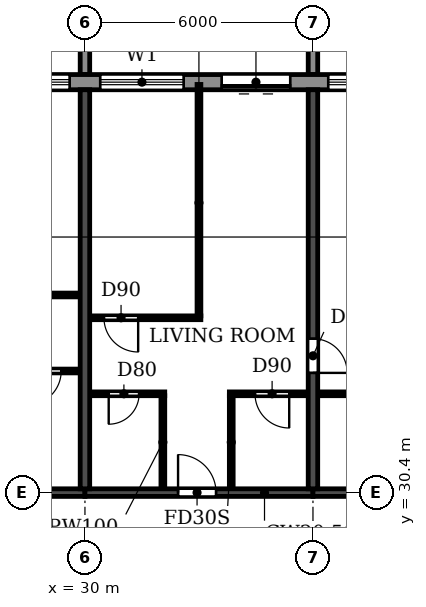
"""IFC4 building model, lengths in metres.
Left out: names, types, materials, properties, quantities, classifications, styles, units other than length and angle.
Written with IfcOpenShell. Run it as: python <this file> out.ifc"""

import sys

from ifc_helpers import new_model, si_unit, direction, frame, frame_2d, origin, place, context, subcontext, project, spatial, polyline, rectangle, outline, extrude, source, transform, mapped, element, fill, save


model = new_model("IFC4")
c1 = context("Model", 3, precision=1e-05, world=origin(), true_north=direction((0.0, 1.0)))
c2 = subcontext(c1, "Body", "Model", "MODEL_VIEW")
j1 = project(units=[si_unit("LENGTHUNIT", "METRE"), si_unit("PLANEANGLEUNIT", "RADIAN")], contexts=[c1])
p1 = place(None, origin())
s1 = spatial("IfcSite", under=j1, at=p1, CompositionType="ELEMENT")
p2 = place(p1, origin())
s2 = spatial("IfcBuilding", under=s1, at=p2, CompositionType="ELEMENT")
p3 = place(p2, frame((0.0, 0.0, 181.8)))
s3 = spatial("IfcBuildingStorey", under=s2, at=p3, CompositionType="ELEMENT", Elevation=181.8)
p4 = place(p3, frame((30.0, 30.5, 0.0), z_axis=(0.0, 0.0, 1.0), x_axis=(0.0, 1.0, 0.0)))
e1 = element("IfcWall", 1, at=p4, inside=s3, PredefinedType="SHEAR", context=c2, shape_type="SweptSolid", body=[
    extrude(rectangle(XDim=10.5, YDim=0.25, at=frame_2d((5.25, 0.0))), origin(), (0.0, 0.0, 1.0), 3.08),
])
p5 = place(p3, frame((36.0, 30.5, 0.0), z_axis=(0.0, 0.0, 1.0), x_axis=(0.0, 1.0, 0.0)))
e2 = element("IfcWall", 2, at=p5, inside=s3, PredefinedType="SHEAR", context=c2, shape_type="SweptSolid", body=[
    extrude(rectangle(XDim=10.5, YDim=0.25, at=frame_2d((5.25, 0.0))), origin(), (0.0, 0.0, 1.0), 3.08),
])
p6 = place(p5, frame((3.05, 0.0, 0.0)))
e3 = element("IfcOpeningElement", 3, at=p6, cuts=e2, PredefinedType="OPENING", context=c2, shape_type="SweptSolid", body=[
    extrude(rectangle(XDim=0.9, YDim=2.1, at=frame_2d((0.45, 1.05))), frame((0.0, 0.135, 0.0), z_axis=(0.0, -1.0, 0.0), x_axis=(1.0, 0.0, 0.0)), (0.0, 0.0, 1.0), 0.27),
])
p7 = place(p3, frame((24.0, 30.4, 0.0), z_axis=(0.0, 0.0, 1.0), x_axis=(1.0, 0.0, 0.0)))
e4 = element("IfcWall", 4, at=p7, inside=s3, PredefinedType="SHEAR", context=c2, shape_type="SweptSolid", body=[
    extrude(rectangle(XDim=6.0, YDim=0.2, at=frame_2d((3.0, 0.0))), origin(), (0.0, 0.0, 1.0), 2.48),
])
p8 = place(p7, frame((2.45, 0.0, 0.0)))
e5 = element("IfcOpeningElement", 5, at=p8, cuts=e4, PredefinedType="OPENING", context=c2, shape_type="SweptSolid", body=[
    extrude(rectangle(XDim=1.0, YDim=2.1, at=frame_2d((0.5, 1.05))), frame((0.0, 0.11, 0.0), z_axis=(0.0, -1.0, 0.0), x_axis=(1.0, 0.0, 0.0)), (0.0, 0.0, 1.0), 0.22),
])
p9 = place(p3, frame((30.0, 30.4, 0.0), z_axis=(0.0, 0.0, 1.0), x_axis=(1.0, 0.0, 0.0)))
e6 = element("IfcWall", 6, at=p9, inside=s3, PredefinedType="SHEAR", context=c2, shape_type="SweptSolid", body=[
    extrude(rectangle(XDim=6.0, YDim=0.2, at=frame_2d((3.0, 0.0))), origin(), (0.0, 0.0, 1.0), 2.48),
])
p10 = place(p9, frame((2.45, 0.0, 0.0)))
e7 = element("IfcOpeningElement", 7, at=p10, cuts=e6, PredefinedType="OPENING", context=c2, shape_type="SweptSolid", body=[
    extrude(rectangle(XDim=1.0, YDim=2.1, at=frame_2d((0.5, 1.05))), frame((0.0, 0.11, 0.0), z_axis=(0.0, -1.0, 0.0), x_axis=(1.0, 0.0, 0.0)), (0.0, 0.0, 1.0), 0.22),
])
p11 = place(p3, frame((36.0, 30.4, 0.0), z_axis=(0.0, 0.0, 1.0), x_axis=(1.0, 0.0, 0.0)))
e8 = element("IfcWall", 8, at=p11, inside=s3, PredefinedType="SHEAR", context=c2, shape_type="SweptSolid", body=[
    extrude(rectangle(XDim=6.0, YDim=0.2, at=frame_2d((3.0, 0.0))), origin(), (0.0, 0.0, 1.0), 2.48),
])
p12 = place(p3, frame((79.317, 41.2, 0.0), z_axis=(0.0, 0.0, 1.0), x_axis=(-1.0, 0.0, 0.0)))
e9 = element("IfcWall", 9, at=p12, inside=s3, PredefinedType="STANDARD", context=c2, shape_type="SweptSolid", body=[
    extrude(rectangle(XDim=56.634, YDim=0.4, at=frame_2d((28.317, 0.0))), origin(), (0.0, 0.0, 1.0), 3.08),
])
p13 = place(p12, frame((52.917, 0.0, 0.0)))
e10 = element("IfcOpeningElement", 10, at=p13, cuts=e9, PredefinedType="OPENING", context=c2, shape_type="SweptSolid", body=[
    extrude(rectangle(XDim=1.8, YDim=2.4, at=frame_2d((0.9, 1.2))), frame((0.0, 0.21, 0.0), z_axis=(0.0, -1.0, 0.0), x_axis=(1.0, 0.0, 0.0)), (0.0, 0.0, 1.0), 0.42),
])
p14 = place(p12, frame((49.717, 0.0, 0.9)))
e11 = element("IfcOpeningElement", 11, at=p14, cuts=e9, PredefinedType="OPENING", context=c2, shape_type="SweptSolid", body=[
    extrude(rectangle(XDim=2.2, YDim=1.5, at=frame_2d((1.1, 0.75))), frame((0.0, 0.21, 0.0), z_axis=(0.0, -1.0, 0.0), x_axis=(1.0, 0.0, 0.0)), (0.0, 0.0, 1.0), 0.42),
])
p15 = place(p12, frame((46.717, 0.0, 0.9)))
e12 = element("IfcOpeningElement", 12, at=p15, cuts=e9, PredefinedType="OPENING", context=c2, shape_type="SweptSolid", body=[
    extrude(rectangle(XDim=2.2, YDim=1.5, at=frame_2d((1.1, 0.75))), frame((0.0, 0.21, 0.0), z_axis=(0.0, -1.0, 0.0), x_axis=(1.0, 0.0, 0.0)), (0.0, 0.0, 1.0), 0.42),
])
p16 = place(p12, frame((43.917, 0.0, 0.0)))
e13 = element("IfcOpeningElement", 13, at=p16, cuts=e9, PredefinedType="OPENING", context=c2, shape_type="SweptSolid", body=[
    extrude(rectangle(XDim=1.8, YDim=2.4, at=frame_2d((0.9, 1.2))), frame((0.0, 0.21, 0.0), z_axis=(0.0, -1.0, 0.0), x_axis=(1.0, 0.0, 0.0)), (0.0, 0.0, 1.0), 0.42),
])
p17 = place(p12, frame((40.717, 0.0, 0.9)))
e14 = element("IfcOpeningElement", 14, at=p17, cuts=e9, PredefinedType="OPENING", context=c2, shape_type="SweptSolid", body=[
    extrude(rectangle(XDim=2.2, YDim=1.5, at=frame_2d((1.1, 0.75))), frame((0.0, 0.21, 0.0), z_axis=(0.0, -1.0, 0.0), x_axis=(1.0, 0.0, 0.0)), (0.0, 0.0, 1.0), 0.42),
])
p18 = place(p12, frame((37.717, 0.0, 0.9)))
e15 = element("IfcOpeningElement", 15, at=p18, cuts=e9, PredefinedType="OPENING", context=c2, shape_type="SweptSolid", body=[
    extrude(rectangle(XDim=2.2, YDim=1.5, at=frame_2d((1.1, 0.75))), frame((0.0, 0.21, 0.0), z_axis=(0.0, -1.0, 0.0), x_axis=(1.0, 0.0, 0.0)), (0.0, 0.0, 1.0), 0.42),
])
p19 = place(p12, frame((34.917, 0.0, 0.0)))
e16 = element("IfcOpeningElement", 16, at=p19, cuts=e9, PredefinedType="OPENING", context=c2, shape_type="SweptSolid", body=[
    extrude(rectangle(XDim=1.8, YDim=2.4, at=frame_2d((0.9, 1.2))), frame((0.0, 0.21, 0.0), z_axis=(0.0, -1.0, 0.0), x_axis=(1.0, 0.0, 0.0)), (0.0, 0.0, 1.0), 0.42),
])
p20 = place(p12, frame((31.717, 0.0, 0.9)))
e17 = element("IfcOpeningElement", 17, at=p20, cuts=e9, PredefinedType="OPENING", context=c2, shape_type="SweptSolid", body=[
    extrude(rectangle(XDim=2.2, YDim=1.5, at=frame_2d((1.1, 0.75))), frame((0.0, 0.21, 0.0), z_axis=(0.0, -1.0, 0.0), x_axis=(1.0, 0.0, 0.0)), (0.0, 0.0, 1.0), 0.42),
])
p21 = place(p12, frame((28.717, 0.0, 0.9)))
e18 = element("IfcOpeningElement", 18, at=p21, cuts=e9, PredefinedType="OPENING", context=c2, shape_type="SweptSolid", body=[
    extrude(rectangle(XDim=2.2, YDim=1.5, at=frame_2d((1.1, 0.75))), frame((0.0, 0.21, 0.0), z_axis=(0.0, -1.0, 0.0), x_axis=(1.0, 0.0, 0.0)), (0.0, 0.0, 1.0), 0.42),
])
p22 = place(p12, frame((25.717, 0.0, 0.9)))
e19 = element("IfcOpeningElement", 19, at=p22, cuts=e9, PredefinedType="OPENING", context=c2, shape_type="SweptSolid", body=[
    extrude(rectangle(XDim=2.2, YDim=1.5, at=frame_2d((1.1, 0.75))), frame((0.0, 0.21, 0.0), z_axis=(0.0, -1.0, 0.0), x_axis=(1.0, 0.0, 0.0)), (0.0, 0.0, 1.0), 0.42),
])
p23 = place(p12, frame((22.917, 0.0, 0.0)))
e20 = element("IfcOpeningElement", 20, at=p23, cuts=e9, PredefinedType="OPENING", context=c2, shape_type="SweptSolid", body=[
    extrude(rectangle(XDim=1.8, YDim=2.4, at=frame_2d((0.9, 1.2))), frame((0.0, 0.21, 0.0), z_axis=(0.0, -1.0, 0.0), x_axis=(1.0, 0.0, 0.0)), (0.0, 0.0, 1.0), 0.42),
])
p24 = place(p12, frame((19.717, 0.0, 0.9)))
e21 = element("IfcOpeningElement", 21, at=p24, cuts=e9, PredefinedType="OPENING", context=c2, shape_type="SweptSolid", body=[
    extrude(rectangle(XDim=2.2, YDim=1.5, at=frame_2d((1.1, 0.75))), frame((0.0, 0.21, 0.0), z_axis=(0.0, -1.0, 0.0), x_axis=(1.0, 0.0, 0.0)), (0.0, 0.0, 1.0), 0.42),
])
p25 = place(p12, frame((16.917, 0.0, 0.0)))
e22 = element("IfcOpeningElement", 22, at=p25, cuts=e9, PredefinedType="OPENING", context=c2, shape_type="SweptSolid", body=[
    extrude(rectangle(XDim=1.8, YDim=2.4, at=frame_2d((0.9, 1.2))), frame((0.0, 0.21, 0.0), z_axis=(0.0, -1.0, 0.0), x_axis=(1.0, 0.0, 0.0)), (0.0, 0.0, 1.0), 0.42),
])
p26 = place(p12, frame((13.717, 0.0, 0.9)))
e23 = element("IfcOpeningElement", 23, at=p26, cuts=e9, PredefinedType="OPENING", context=c2, shape_type="SweptSolid", body=[
    extrude(rectangle(XDim=2.2, YDim=1.5, at=frame_2d((1.1, 0.75))), frame((0.0, 0.21, 0.0), z_axis=(0.0, -1.0, 0.0), x_axis=(1.0, 0.0, 0.0)), (0.0, 0.0, 1.0), 0.42),
])
p27 = place(p12, frame((10.917, 0.0, 0.0)))
e24 = element("IfcOpeningElement", 24, at=p27, cuts=e9, PredefinedType="OPENING", context=c2, shape_type="SweptSolid", body=[
    extrude(rectangle(XDim=1.8, YDim=2.4, at=frame_2d((0.9, 1.2))), frame((0.0, 0.21, 0.0), z_axis=(0.0, -1.0, 0.0), x_axis=(1.0, 0.0, 0.0)), (0.0, 0.0, 1.0), 0.42),
])
p28 = place(p12, frame((7.717, 0.0, 0.9)))
e25 = element("IfcOpeningElement", 25, at=p28, cuts=e9, PredefinedType="OPENING", context=c2, shape_type="SweptSolid", body=[
    extrude(rectangle(XDim=2.2, YDim=1.5, at=frame_2d((1.1, 0.75))), frame((0.0, 0.21, 0.0), z_axis=(0.0, -1.0, 0.0), x_axis=(1.0, 0.0, 0.0)), (0.0, 0.0, 1.0), 0.42),
])
p29 = place(p12, frame((4.717, 0.0, 0.9)))
e26 = element("IfcOpeningElement", 26, at=p29, cuts=e9, PredefinedType="OPENING", context=c2, shape_type="SweptSolid", body=[
    extrude(rectangle(XDim=2.2, YDim=1.5, at=frame_2d((1.1, 0.75))), frame((0.0, 0.21, 0.0), z_axis=(0.0, -1.0, 0.0), x_axis=(1.0, 0.0, 0.0)), (0.0, 0.0, 1.0), 0.42),
])
p30 = place(p12, frame((1.917, 0.0, 0.0)))
e27 = element("IfcOpeningElement", 27, at=p30, cuts=e9, PredefinedType="OPENING", context=c2, shape_type="SweptSolid", body=[
    extrude(rectangle(XDim=1.8, YDim=2.4, at=frame_2d((0.9, 1.2))), frame((0.0, 0.21, 0.0), z_axis=(0.0, -1.0, 0.0), x_axis=(1.0, 0.0, 0.0)), (0.0, 0.0, 1.0), 0.42),
])
m1 = source(origin(), c2, "Body", "SweptSolid", [
    extrude(outline(polyline([(0.0, 0.0), (0.25, 0.0), (0.25, 3.1), (0.0, 3.1), (0.0, 0.0)])), origin(), (0.0, 0.0, 1.0), 3.1),
])
for number, where in (
    (28, (29.875, 41.4, 0.0)),
    (29, (35.875, 41.4, 0.0)),
):
    element("IfcWall", number, at=place(p3, frame(where)), inside=s3, PredefinedType="STANDARD", context=c2, shape_type="MappedRepresentation", body=[
        mapped(m1, transform((0.0, 0.0, 0.0))),
    ])
p31 = place(p3, frame((30.135, 33.0, 0.0), z_axis=(0.0, 0.0, 1.0), x_axis=(1.0, 0.0, 0.0)))
e30 = element("IfcWall", 30, at=p31, inside=s3, PredefinedType="PARTITIONING", context=c2, shape_type="SweptSolid", body=[
    extrude(rectangle(XDim=1.965, YDim=0.1, at=frame_2d((0.982, 0.0))), origin(), (0.0, 0.0, 1.0), 3.08),
])
p32 = place(p31, frame((0.49, 0.0, 0.0)))
e31 = element("IfcOpeningElement", 31, at=p32, cuts=e30, PredefinedType="OPENING", context=c2, shape_type="SweptSolid", body=[
    extrude(rectangle(XDim=0.8, YDim=2.1, at=frame_2d((0.4, 1.05))), frame((0.0, 0.06, 0.0), z_axis=(0.0, -1.0, 0.0), x_axis=(1.0, 0.0, 0.0)), (0.0, 0.0, 1.0), 0.12),
])
p33 = place(p3, frame((33.8, 33.0, 0.0), z_axis=(0.0, 0.0, 1.0), x_axis=(1.0, 0.0, 0.0)))
e32 = element("IfcWall", 32, at=p33, inside=s3, PredefinedType="PARTITIONING", context=c2, shape_type="SweptSolid", body=[
    extrude(rectangle(XDim=2.065, YDim=0.1, at=frame_2d((1.032, 0.0))), origin(), (0.0, 0.0, 1.0), 3.08),
])
p34 = place(p33, frame((0.675, 0.0, 0.0)))
e33 = element("IfcOpeningElement", 33, at=p34, cuts=e32, PredefinedType="OPENING", context=c2, shape_type="SweptSolid", body=[
    extrude(rectangle(XDim=0.9, YDim=2.1, at=frame_2d((0.45, 1.05))), frame((0.0, 0.06, 0.0), z_axis=(0.0, -1.0, 0.0), x_axis=(1.0, 0.0, 0.0)), (0.0, 0.0, 1.0), 0.12),
])
p35 = place(p3, frame((36.135, 33.0, 0.0), z_axis=(0.0, 0.0, 1.0), x_axis=(1.0, 0.0, 0.0)))
e34 = element("IfcWall", 34, at=p35, inside=s3, PredefinedType="PARTITIONING", context=c2, shape_type="SweptSolid", body=[
    extrude(rectangle(XDim=2.965, YDim=0.1, at=frame_2d((1.482, 0.0))), origin(), (0.0, 0.0, 1.0), 3.08),
])
p36 = place(p35, frame((0.965, 0.0, 0.0)))
e35 = element("IfcOpeningElement", 35, at=p36, cuts=e34, PredefinedType="OPENING", context=c2, shape_type="SweptSolid", body=[
    extrude(rectangle(XDim=0.8, YDim=2.1, at=frame_2d((0.4, 1.05))), frame((0.0, 0.06, 0.0), z_axis=(0.0, -1.0, 0.0), x_axis=(1.0, 0.0, 0.0)), (0.0, 0.0, 1.0), 0.12),
])
p37 = place(p3, frame((27.8, 33.6, 0.0), z_axis=(0.0, 0.0, 1.0), x_axis=(1.0, 0.0, 0.0)))
e36 = element("IfcWall", 36, at=p37, inside=s3, PredefinedType="PARTITIONING", context=c2, shape_type="SweptSolid", body=[
    extrude(rectangle(XDim=2.065, YDim=0.1, at=frame_2d((1.032, 0.0))), origin(), (0.0, 0.0, 1.0), 3.08),
])
p38 = place(p37, frame((0.675, 0.0, 0.0)))
e37 = element("IfcOpeningElement", 37, at=p38, cuts=e36, PredefinedType="OPENING", context=c2, shape_type="SweptSolid", body=[
    extrude(rectangle(XDim=0.9, YDim=2.1, at=frame_2d((0.45, 1.05))), frame((0.0, 0.06, 0.0), z_axis=(0.0, -1.0, 0.0), x_axis=(1.0, 0.0, 0.0)), (0.0, 0.0, 1.0), 0.12),
])
p39 = place(p3, frame((30.135, 35.0, 0.0), z_axis=(0.0, 0.0, 1.0), x_axis=(1.0, 0.0, 0.0)))
e38 = element("IfcWall", 38, at=p39, inside=s3, PredefinedType="PARTITIONING", context=c2, shape_type="SweptSolid", body=[
    extrude(rectangle(XDim=2.915, YDim=0.1, at=frame_2d((1.458, 0.0))), origin(), (0.0, 0.0, 1.0), 3.08),
])
p40 = place(p39, frame((0.365, 0.0, 0.0)))
e39 = element("IfcOpeningElement", 39, at=p40, cuts=e38, PredefinedType="OPENING", context=c2, shape_type="SweptSolid", body=[
    extrude(rectangle(XDim=0.9, YDim=2.1, at=frame_2d((0.45, 1.05))), frame((0.0, 0.06, 0.0), z_axis=(0.0, -1.0, 0.0), x_axis=(1.0, 0.0, 0.0)), (0.0, 0.0, 1.0), 0.12),
])
p41 = place(p3, frame((26.95, 35.6, 0.0), z_axis=(0.0, 0.0, 1.0), x_axis=(1.0, 0.0, 0.0)))
e40 = element("IfcWall", 40, at=p41, inside=s3, PredefinedType="PARTITIONING", context=c2, shape_type="SweptSolid", body=[
    extrude(rectangle(XDim=2.915, YDim=0.1, at=frame_2d((1.458, 0.0))), origin(), (0.0, 0.0, 1.0), 3.08),
])
p42 = place(p41, frame((0.55, 0.0, 0.0)))
e41 = element("IfcOpeningElement", 41, at=p42, cuts=e40, PredefinedType="OPENING", context=c2, shape_type="SweptSolid", body=[
    extrude(rectangle(XDim=0.9, YDim=2.1, at=frame_2d((0.45, 1.05))), frame((0.0, 0.06, 0.0), z_axis=(0.0, -1.0, 0.0), x_axis=(1.0, 0.0, 0.0)), (0.0, 0.0, 1.0), 0.12),
])
p43 = place(p3, frame((32.05, 30.51, 0.0), z_axis=(0.0, 0.0, 1.0), x_axis=(0.0, 1.0, 0.0)))
e42 = element("IfcWall", 42, at=p43, inside=s3, PredefinedType="PARTITIONING", context=c2, shape_type="SweptSolid", body=[
    extrude(rectangle(XDim=2.44, YDim=0.1, at=frame_2d((1.22, 0.0))), origin(), (0.0, 0.0, 1.0), 3.08),
])
p44 = place(p3, frame((33.0, 35.05, 0.0), z_axis=(0.0, 0.0, 1.0), x_axis=(0.0, 1.0, 0.0)))
e43 = element("IfcWall", 43, at=p44, inside=s3, PredefinedType="PARTITIONING", context=c2, shape_type="SweptSolid", body=[
    extrude(rectangle(XDim=6.09, YDim=0.1, at=frame_2d((3.045, 0.0))), origin(), (0.0, 0.0, 1.0), 3.08),
])
p45 = place(p3, frame((33.85, 30.51, 0.0), z_axis=(0.0, 0.0, 1.0), x_axis=(0.0, 1.0, 0.0)))
e44 = element("IfcWall", 44, at=p45, inside=s3, PredefinedType="PARTITIONING", context=c2, shape_type="SweptSolid", body=[
    extrude(rectangle(XDim=2.44, YDim=0.1, at=frame_2d((1.22, 0.0))), origin(), (0.0, 0.0, 1.0), 3.08),
])
p46 = place(p14, origin())
e45 = element("IfcWindow", 45, at=p46, inside=s3, PartitioningType="DOUBLE_PANEL_HORIZONTAL", PredefinedType="WINDOW", context=c2, shape_type="SweptSolid", body=[
    extrude(rectangle(XDim=2.2, YDim=1.5, at=frame_2d((1.1, 0.75))), frame((0.0, 0.03, 0.0), z_axis=(0.0, -1.0, 0.0), x_axis=(1.0, 0.0, 0.0)), (0.0, 0.0, 1.0), 0.06),
])
fill(e11, e45)
p47 = place(p15, origin())
e46 = element("IfcWindow", 46, at=p47, inside=s3, PartitioningType="DOUBLE_PANEL_HORIZONTAL", PredefinedType="WINDOW", context=c2, shape_type="SweptSolid", body=[
    extrude(rectangle(XDim=2.2, YDim=1.5, at=frame_2d((1.1, 0.75))), frame((0.0, 0.03, 0.0), z_axis=(0.0, -1.0, 0.0), x_axis=(1.0, 0.0, 0.0)), (0.0, 0.0, 1.0), 0.06),
])
fill(e12, e46)
p48 = place(p16, origin())
e47 = element("IfcDoor", 47, at=p48, inside=s3, OperationType="DOUBLE_DOOR_SLIDING", PredefinedType="DOOR", context=c2, shape_type="SweptSolid", body=[
    extrude(rectangle(XDim=1.8, YDim=2.4, at=frame_2d((0.9, 1.2))), frame((0.0, 0.025, 0.0), z_axis=(0.0, -1.0, 0.0), x_axis=(1.0, 0.0, 0.0)), (0.0, 0.0, 1.0), 0.05),
])
fill(e13, e47)
p49 = place(p17, origin())
e48 = element("IfcWindow", 48, at=p49, inside=s3, PartitioningType="DOUBLE_PANEL_HORIZONTAL", PredefinedType="WINDOW", context=c2, shape_type="SweptSolid", body=[
    extrude(rectangle(XDim=2.2, YDim=1.5, at=frame_2d((1.1, 0.75))), frame((0.0, 0.03, 0.0), z_axis=(0.0, -1.0, 0.0), x_axis=(1.0, 0.0, 0.0)), (0.0, 0.0, 1.0), 0.06),
])
fill(e14, e48)
p50 = place(p38, frame((0.9, 0.0, 0.0), z_axis=(0.0, 0.0, 1.0), x_axis=(-1.0, 0.0, 0.0)))
e49 = element("IfcDoor", 49, at=p50, inside=s3, OperationType="SINGLE_SWING_RIGHT", PredefinedType="DOOR", context=c2, shape_type="SweptSolid", body=[
    extrude(rectangle(XDim=0.9, YDim=2.1, at=frame_2d((0.45, 1.05))), frame((0.0, 0.025, 0.0), z_axis=(0.0, -1.0, 0.0), x_axis=(1.0, 0.0, 0.0)), (0.0, 0.0, 1.0), 0.05),
])
fill(e37, e49)
p51 = place(p40, frame((0.9, 0.0, 0.0), z_axis=(0.0, 0.0, 1.0), x_axis=(-1.0, 0.0, 0.0)))
e50 = element("IfcDoor", 50, at=p51, inside=s3, OperationType="SINGLE_SWING_LEFT", PredefinedType="DOOR", context=c2, shape_type="SweptSolid", body=[
    extrude(rectangle(XDim=0.9, YDim=2.1, at=frame_2d((0.45, 1.05))), frame((0.0, 0.025, 0.0), z_axis=(0.0, -1.0, 0.0), x_axis=(1.0, 0.0, 0.0)), (0.0, 0.0, 1.0), 0.05),
])
fill(e39, e50)
p52 = place(p32, frame((0.8, 0.0, 0.0), z_axis=(0.0, 0.0, 1.0), x_axis=(-1.0, 0.0, 0.0)))
e51 = element("IfcDoor", 51, at=p52, inside=s3, OperationType="SINGLE_SWING_RIGHT", PredefinedType="DOOR", context=c2, shape_type="SweptSolid", body=[
    extrude(rectangle(XDim=0.8, YDim=2.1, at=frame_2d((0.4, 1.05))), frame((0.0, 0.025, 0.0), z_axis=(0.0, -1.0, 0.0), x_axis=(1.0, 0.0, 0.0)), (0.0, 0.0, 1.0), 0.05),
])
fill(e31, e51)
p53 = place(p10, origin())
e52 = element("IfcDoor", 52, at=p53, inside=s3, OperationType="SINGLE_SWING_LEFT", PredefinedType="DOOR", context=c2, shape_type="SweptSolid", body=[
    extrude(rectangle(XDim=1.0, YDim=2.1, at=frame_2d((0.5, 1.05))), frame((0.0, 0.025, 0.0), z_axis=(0.0, -1.0, 0.0), x_axis=(1.0, 0.0, 0.0)), (0.0, 0.0, 1.0), 0.05),
])
fill(e7, e52)
p54 = place(p34, frame((0.9, 0.0, 0.0), z_axis=(0.0, 0.0, 1.0), x_axis=(-1.0, 0.0, 0.0)))
e53 = element("IfcDoor", 53, at=p54, inside=s3, OperationType="SINGLE_SWING_LEFT", PredefinedType="DOOR", context=c2, shape_type="SweptSolid", body=[
    extrude(rectangle(XDim=0.9, YDim=2.1, at=frame_2d((0.45, 1.05))), frame((0.0, 0.025, 0.0), z_axis=(0.0, -1.0, 0.0), x_axis=(1.0, 0.0, 0.0)), (0.0, 0.0, 1.0), 0.05),
])
fill(e33, e53)
p55 = place(p6, frame((0.9, 0.0, 0.0), z_axis=(0.0, 0.0, 1.0), x_axis=(-1.0, 0.0, 0.0)))
e54 = element("IfcDoor", 54, at=p55, inside=s3, OperationType="SINGLE_SWING_RIGHT", PredefinedType="DOOR", context=c2, shape_type="SweptSolid", body=[
    extrude(rectangle(XDim=0.9, YDim=2.1, at=frame_2d((0.45, 1.05))), frame((0.0, 0.025, 0.0), z_axis=(0.0, -1.0, 0.0), x_axis=(1.0, 0.0, 0.0)), (0.0, 0.0, 1.0), 0.05),
])
fill(e3, e54)
save(model, sys.argv[1])
